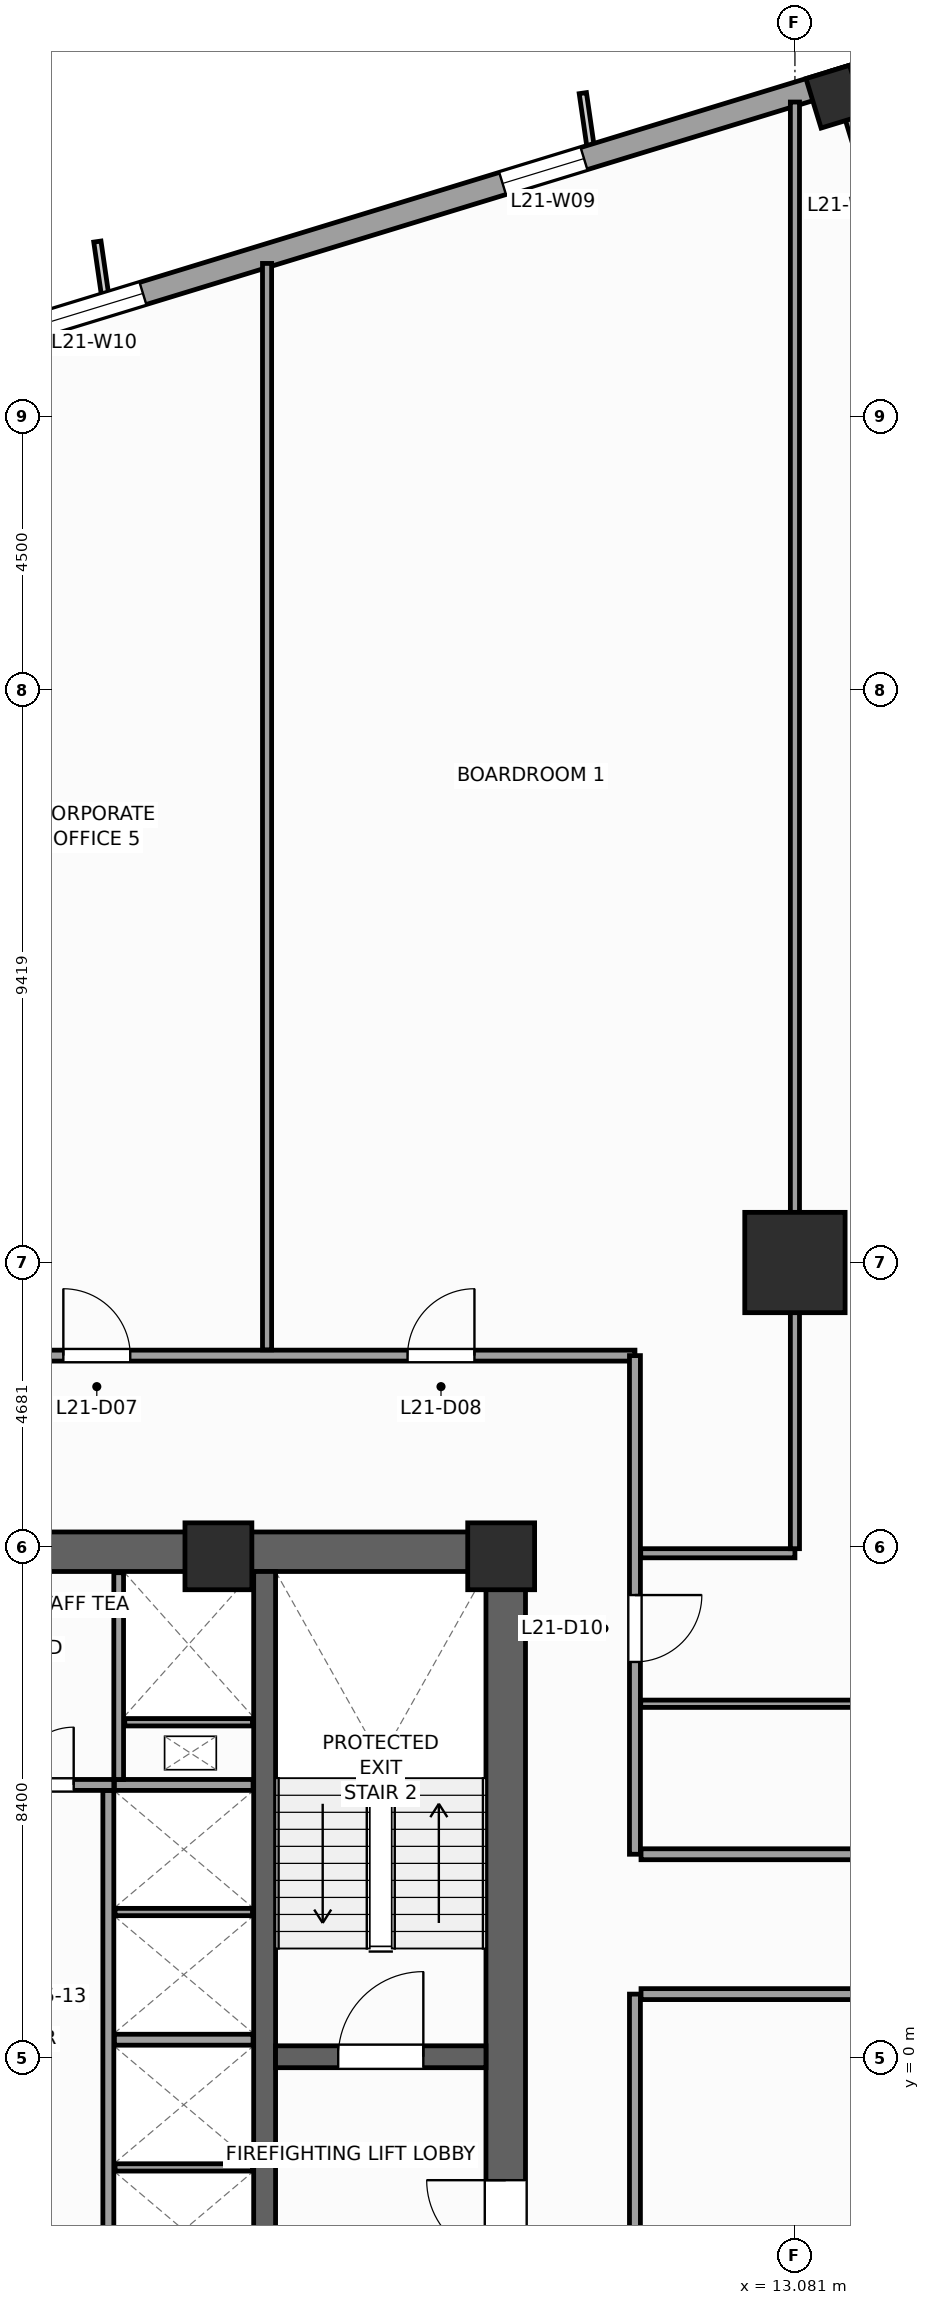
"""IFC4 building model, lengths in metres.
Left out: names, types, materials, properties, quantities, classifications, styles, units other than length and angle.
Written with IfcOpenShell. Run it as: python <this file> out.ifc"""

import sys

from ifc_helpers import new_model, si_unit, direction, frame, frame_2d, origin, origin_2d, place, context, subcontext, project, spatial, rectangle, extrude, source, transform, mapped, element, fill, save


model = new_model("IFC4")
c1 = context("Model", 3, precision=1e-05, world=origin(), true_north=direction((0.0, 1.0)))
c2 = subcontext(c1, "Body", "Model", "MODEL_VIEW")
j1 = project(units=[si_unit("LENGTHUNIT", "METRE"), si_unit("PLANEANGLEUNIT", "RADIAN")], contexts=[c1])
p1 = place(None, origin())
s1 = spatial("IfcSite", under=j1, at=p1, CompositionType="ELEMENT")
p2 = place(p1, origin())
s2 = spatial("IfcBuilding", under=s1, at=p2, CompositionType="ELEMENT")
p3 = place(p2, frame((0.0, 0.0, 91.2)))
s3 = spatial("IfcBuildingStorey", under=s2, at=p3, CompositionType="ELEMENT", Elevation=91.2)
p4 = place(p3, frame((-8.65, 8.325, 0.0), z_axis=(0.0, 0.0, 1.0), x_axis=(1.0, 0.0, 0.0)))
e1 = element("IfcWall", 1, at=p4, inside=s3, PredefinedType="SHEAR", context=c2, shape_type="SweptSolid", body=[
    extrude(rectangle(XDim=17.3, YDim=0.65, at=frame_2d((8.65, 0.0))), origin(), (0.0, 0.0, 1.0), 4.0),
])
p5 = place(p3, frame((8.325, -8.0, 0.0), z_axis=(0.0, 0.0, 1.0), x_axis=(0.0, 1.0, 0.0)))
e2 = element("IfcWall", 2, at=p5, inside=s3, PredefinedType="SHEAR", context=c2, shape_type="SweptSolid", body=[
    extrude(rectangle(XDim=16.0, YDim=0.65, at=frame_2d((8.0, 0.0))), origin(), (0.0, 0.0, 1.0), 4.0),
])
p6 = place(p5, frame((4.69, 0.0, 0.0)))
e3 = element("IfcOpeningElement", 3, at=p6, cuts=e2, PredefinedType="OPENING", context=c2, shape_type="SweptSolid", body=[
    extrude(rectangle(XDim=1.3, YDim=2.2, at=frame_2d((0.65, 1.1))), frame((0.0, 0.335, 0.0), z_axis=(0.0, -1.0, 0.0), x_axis=(1.0, 0.0, 0.0)), (0.0, 0.0, 1.0), 0.67),
])
p7 = place(p3, frame((4.36, -8.0, 0.0), z_axis=(0.0, 0.0, 1.0), x_axis=(0.0, 1.0, 0.0)))
e4 = element("IfcWall", 4, at=p7, inside=s3, PredefinedType="SHEAR", context=c2, shape_type="SweptSolid", body=[
    extrude(rectangle(XDim=16.0, YDim=0.36, at=frame_2d((8.0, 0.0))), origin(), (0.0, 0.0, 1.0), 4.0),
])
p8 = place(p3, frame((4.54, 0.02, 0.0), z_axis=(0.0, 0.0, 1.0), x_axis=(1.0, 0.0, 0.0)))
e5 = element("IfcWall", 5, at=p8, inside=s3, PredefinedType="SHEAR", context=c2, shape_type="SweptSolid", body=[
    extrude(rectangle(XDim=3.46, YDim=0.36, at=frame_2d((1.73, 0.0))), origin(), (0.0, 0.0, 1.0), 4.0),
])
p9 = place(p8, frame((1.03, 0.0, 0.0)))
e6 = element("IfcOpeningElement", 6, at=p9, cuts=e5, PredefinedType="OPENING", context=c2, shape_type="SweptSolid", body=[
    extrude(rectangle(XDim=1.4, YDim=2.2, at=frame_2d((0.7, 1.1))), frame((0.0, 0.19, 0.0), z_axis=(0.0, -1.0, 0.0), x_axis=(1.0, 0.0, 0.0)), (0.0, 0.0, 1.0), 0.38),
])
m1 = source(origin(), c2, "Body", "SweptSolid", [
    extrude(rectangle(XDim=1.1, YDim=1.1, at=origin_2d()), origin(), (0.0, 0.0, 1.0), 4.0),
])
for number, where, z_axis, x_axis in (
    (7, (8.25, 8.25, 0.0), (0.0, 0.0, 1.0), (1.0, 0.0, 0.0)),
    (8, (3.6, 8.25, 0.0), (0.0, 0.0, 1.0), (1.0, 0.0, 0.0)),
):
    element("IfcColumn", number, at=place(p3, frame(where, z_axis=z_axis, x_axis=x_axis)), inside=s3, PredefinedType="PILASTER", context=c2, shape_type="MappedRepresentation", body=[
        mapped(m1, transform((0.0, 0.0, 0.0), scale=1.0)),
    ])
m2 = source(origin(), c2, "Body", "SweptSolid", [
    extrude(rectangle(XDim=1.65, YDim=1.65, at=origin_2d()), origin(), (0.0, 0.0, 1.0), 4.0),
])
p10 = place(p3, frame((13.081, 13.081, 0.0), z_axis=(0.0, 0.0, 1.0), x_axis=(1.0, 0.0, 0.0)))
e9 = element("IfcColumn", 9, at=p10, inside=s3, PredefinedType="COLUMN", context=c2, shape_type="MappedRepresentation", body=[
    mapped(m2, transform((0.0, 0.0, 0.0), scale=1.0)),
])
m3 = source(origin(), c2, "Body", "SweptSolid", [
    extrude(rectangle(XDim=0.75, YDim=0.85, at=origin_2d()), origin(), (0.0, 0.0, 1.0), 4.0),
])
p11 = place(p3, frame((13.746, 32.253, 0.0), z_axis=(0.0, 0.0, 1.0), x_axis=(0.956304755963, 0.292371704723, 0.0)))
e10 = element("IfcColumn", 10, at=p11, inside=s3, PredefinedType="COLUMN", context=c2, shape_type="MappedRepresentation", body=[
    mapped(m3, transform((0.0, 0.0, 0.0), scale=1.0)),
])
p12 = place(p3, frame((15.144, 28.482, 0.0), z_axis=(0.0, 0.0, 1.0), x_axis=(-0.292373601522, 0.956304176051, 0.0)))
e11 = element("IfcWall", 11, at=p12, inside=s3, PredefinedType="STANDARD", context=c2, shape_type="SweptSolid", body=[
    extrude(rectangle(XDim=4.44, YDim=0.38, at=frame_2d((2.22, 0.0))), origin(), (0.0, 0.0, 1.0), 3.04),
])
p13 = place(p12, frame((1.52, 0.0, 0.51)))
e12 = element("IfcOpeningElement", 12, at=p13, cuts=e11, PredefinedType="OPENING", context=c2, shape_type="SweptSolid", body=[
    extrude(rectangle(XDim=1.4, YDim=2.4, at=frame_2d((0.7, 1.2))), frame((0.0, 0.2, 0.0), z_axis=(0.0, -1.0, 0.0), x_axis=(1.0, 0.0, 0.0)), (0.0, 0.0, 1.0), 0.4),
])
p14 = place(p3, frame((14.265, 32.658, 0.0), z_axis=(0.0, 0.0, 1.0), x_axis=(-0.956304320851, -0.292373127906, 0.0)))
e13 = element("IfcWall", 13, at=p14, inside=s3, PredefinedType="STANDARD", context=c2, shape_type="SweptSolid", body=[
    extrude(rectangle(XDim=46.38, YDim=0.38, at=frame_2d((23.19, 0.0))), origin(), (0.0, 0.0, 1.0), 3.14),
])
p15 = place(p14, frame((17.065, 0.0, 0.0)))
e14 = element("IfcOpeningElement", 14, at=p15, cuts=e13, PredefinedType="OPENING", context=c2, shape_type="SweptSolid", body=[
    extrude(rectangle(XDim=1.05, YDim=2.25, at=frame_2d((0.525, 1.125))), frame((0.0, 0.2, 0.0), z_axis=(0.0, -1.0, 0.0), x_axis=(1.0, 0.0, 0.0)), (0.0, 0.0, 1.0), 0.4),
])
p16 = place(p14, frame((4.865, 0.0, 0.51)))
e15 = element("IfcOpeningElement", 15, at=p16, cuts=e13, PredefinedType="OPENING", context=c2, shape_type="SweptSolid", body=[
    extrude(rectangle(XDim=1.4, YDim=2.4, at=frame_2d((0.7, 1.2))), frame((0.0, 0.2, 0.0), z_axis=(0.0, -1.0, 0.0), x_axis=(1.0, 0.0, 0.0)), (0.0, 0.0, 1.0), 0.4),
])
p17 = place(p14, frame((12.45, 0.0, 0.51)))
e16 = element("IfcOpeningElement", 16, at=p17, cuts=e13, PredefinedType="OPENING", context=c2, shape_type="SweptSolid", body=[
    extrude(rectangle(XDim=2.0, YDim=2.4, at=frame_2d((1.0, 1.2))), frame((0.0, 0.2, 0.0), z_axis=(0.0, -1.0, 0.0), x_axis=(1.0, 0.0, 0.0)), (0.0, 0.0, 1.0), 0.4),
])
p18 = place(p14, frame((30.538, 0.0, 0.51)))
e17 = element("IfcOpeningElement", 17, at=p18, cuts=e13, PredefinedType="OPENING", context=c2, shape_type="SweptSolid", body=[
    extrude(rectangle(XDim=2.0, YDim=2.4, at=frame_2d((1.0, 1.2))), frame((0.0, 0.2, 0.0), z_axis=(0.0, -1.0, 0.0), x_axis=(1.0, 0.0, 0.0)), (0.0, 0.0, 1.0), 0.4),
])
p19 = place(p14, frame((39.187, 0.0, 0.51)))
e18 = element("IfcOpeningElement", 18, at=p19, cuts=e13, PredefinedType="OPENING", context=c2, shape_type="SweptSolid", body=[
    extrude(rectangle(XDim=1.4, YDim=2.4, at=frame_2d((0.7, 1.2))), frame((0.0, 0.2, 0.0), z_axis=(0.0, -1.0, 0.0), x_axis=(1.0, 0.0, 0.0)), (0.0, 0.0, 1.0), 0.4),
])
p20 = place(p3, frame((1.79, -7.98, 0.0), z_axis=(0.0, 0.0, 1.0), x_axis=(0.0, 1.0, 0.0)))
e19 = element("IfcWall", 19, at=p20, inside=s3, PredefinedType="PARTITIONING", context=c2, shape_type="SweptSolid", body=[
    extrude(rectangle(XDim=12.38, YDim=0.18, at=frame_2d((6.19, 0.0))), origin(), (0.0, 0.0, 1.0), 3.74),
])
p21 = place(p20, frame((0.4, 0.0, 0.0)))
e20 = element("IfcOpeningElement", 20, at=p21, cuts=e19, PredefinedType="OPENING", context=c2, shape_type="SweptSolid", body=[
    extrude(rectangle(XDim=1.1, YDim=2.2, at=frame_2d((0.55, 1.1))), frame((0.0, 0.1, 0.0), z_axis=(0.0, -1.0, 0.0), x_axis=(1.0, 0.0, 0.0)), (0.0, 0.0, 1.0), 0.2),
])
p22 = place(p20, frame((2.46, 0.0, 0.0)))
e21 = element("IfcOpeningElement", 21, at=p22, cuts=e19, PredefinedType="OPENING", context=c2, shape_type="SweptSolid", body=[
    extrude(rectangle(XDim=1.1, YDim=2.2, at=frame_2d((0.55, 1.1))), frame((0.0, 0.1, 0.0), z_axis=(0.0, -1.0, 0.0), x_axis=(1.0, 0.0, 0.0)), (0.0, 0.0, 1.0), 0.2),
])
p23 = place(p3, frame((-1.88, 4.49, 0.0), z_axis=(0.0, 0.0, 1.0), x_axis=(1.0, 0.0, 0.0)))
e22 = element("IfcWall", 22, at=p23, inside=s3, PredefinedType="PARTITIONING", context=c2, shape_type="SweptSolid", body=[
    extrude(rectangle(XDim=3.76, YDim=0.18, at=frame_2d((1.88, 0.0))), origin(), (0.0, 0.0, 1.0), 3.74),
])
p24 = place(p23, frame((0.28, 0.0, 0.0)))
e23 = element("IfcOpeningElement", 23, at=p24, cuts=e22, PredefinedType="OPENING", context=c2, shape_type="SweptSolid", body=[
    extrude(rectangle(XDim=0.88, YDim=2.1, at=frame_2d((0.44, 1.05))), frame((0.0, 0.1, 0.0), z_axis=(0.0, -1.0, 0.0), x_axis=(1.0, 0.0, 0.0)), (0.0, 0.0, 1.0), 0.2),
])
p25 = place(p23, frame((2.15, 0.0, 0.0)))
e24 = element("IfcOpeningElement", 24, at=p25, cuts=e22, PredefinedType="OPENING", context=c2, shape_type="SweptSolid", body=[
    extrude(rectangle(XDim=0.95, YDim=2.1, at=frame_2d((0.475, 1.05))), frame((0.0, 0.1, 0.0), z_axis=(0.0, -1.0, 0.0), x_axis=(1.0, 0.0, 0.0)), (0.0, 0.0, 1.0), 0.2),
])
for number, where, z_axis, x_axis in (
    (25, (1.89, 0.3, 0.0), (0.0, 0.0, 1.0), (1.0, 0.0, 0.0)),
    (26, (1.89, 4.49, 0.0), (0.0, 0.0, 1.0), (1.0, 0.0, 0.0)),
):
    element("IfcWall", number, at=place(p3, frame(where, z_axis=z_axis, x_axis=x_axis)), inside=s3, PredefinedType="PARTITIONING", context=c2, shape_type="SweptSolid", body=[
        extrude(rectangle(XDim=2.28, YDim=0.18, at=frame_2d((1.14, 0.0))), origin(), (0.0, 0.0, 1.0), 3.74),
    ])
for number, where, z_axis, x_axis in (
    (27, (1.9, -1.8, 0.0), (0.0, 0.0, 1.0), (1.0, 0.0, 0.0)),
    (28, (1.9, 2.4, 0.0), (0.0, 0.0, 1.0), (1.0, 0.0, 0.0)),
):
    element("IfcWall", number, at=place(p3, frame(where, z_axis=z_axis, x_axis=x_axis)), inside=s3, PredefinedType="PARTITIONING", context=c2, shape_type="SweptSolid", body=[
        extrude(rectangle(XDim=2.26, YDim=0.12, at=frame_2d((1.13, 0.0))), origin(), (0.0, 0.0, 1.0), 3.74),
    ])
p26 = place(p3, frame((1.96, 4.58, 0.0), z_axis=(0.0, 0.0, 1.0), x_axis=(0.0, 1.0, 0.0)))
e29 = element("IfcWall", 29, at=p26, inside=s3, PredefinedType="PARTITIONING", context=c2, shape_type="SweptSolid", body=[
    extrude(rectangle(XDim=3.4, YDim=0.16, at=frame_2d((1.7, 0.0))), origin(), (0.0, 0.0, 1.0), 3.74),
])
p27 = place(p3, frame((2.06, 5.52, 0.0), z_axis=(0.0, 0.0, 1.0), x_axis=(1.0, 0.0, 0.0)))
e30 = element("IfcWall", 30, at=p27, inside=s3, PredefinedType="PARTITIONING", context=c2, shape_type="SweptSolid", body=[
    extrude(rectangle(XDim=2.1, YDim=0.12, at=frame_2d((1.05, 0.0))), origin(), (0.0, 0.0, 1.0), 3.74),
])
p28 = place(p3, frame((-12.6, 11.55, 0.0), z_axis=(0.0, 0.0, 1.0), x_axis=(1.0, 0.0, 0.0)))
e31 = element("IfcWall", 31, at=p28, inside=s3, PredefinedType="PARTITIONING", context=c2, shape_type="SweptSolid", body=[
    extrude(rectangle(XDim=23.05, YDim=0.18, at=frame_2d((11.525, 0.0))), origin(), (0.0, 0.0, 1.0), 3.74),
])
p29 = place(p28, frame((2.514, 0.0, 0.0)))
e32 = element("IfcOpeningElement", 32, at=p29, cuts=e31, PredefinedType="OPENING", context=c2, shape_type="SweptSolid", body=[
    extrude(rectangle(XDim=1.1, YDim=2.2, at=frame_2d((0.55, 1.1))), frame((0.0, 0.1, 0.0), z_axis=(0.0, -1.0, 0.0), x_axis=(1.0, 0.0, 0.0)), (0.0, 0.0, 1.0), 0.2),
])
p30 = place(p28, frame((8.05, 0.0, 0.0)))
e33 = element("IfcOpeningElement", 33, at=p30, cuts=e31, PredefinedType="OPENING", context=c2, shape_type="SweptSolid", body=[
    extrude(rectangle(XDim=1.1, YDim=2.2, at=frame_2d((0.55, 1.1))), frame((0.0, 0.1, 0.0), z_axis=(0.0, -1.0, 0.0), x_axis=(1.0, 0.0, 0.0)), (0.0, 0.0, 1.0), 0.2),
])
p31 = place(p28, frame((13.65, 0.0, 0.0)))
e34 = element("IfcOpeningElement", 34, at=p31, cuts=e31, PredefinedType="OPENING", context=c2, shape_type="SweptSolid", body=[
    extrude(rectangle(XDim=1.1, YDim=2.2, at=frame_2d((0.55, 1.1))), frame((0.0, 0.1, 0.0), z_axis=(0.0, -1.0, 0.0), x_axis=(1.0, 0.0, 0.0)), (0.0, 0.0, 1.0), 0.2),
])
p32 = place(p28, frame((19.311, 0.0, 0.0)))
e35 = element("IfcOpeningElement", 35, at=p32, cuts=e31, PredefinedType="OPENING", context=c2, shape_type="SweptSolid", body=[
    extrude(rectangle(XDim=1.1, YDim=2.2, at=frame_2d((0.55, 1.1))), frame((0.0, 0.1, 0.0), z_axis=(0.0, -1.0, 0.0), x_axis=(1.0, 0.0, 0.0)), (0.0, 0.0, 1.0), 0.2),
])
p33 = place(p3, frame((10.45, -12.6, 0.0), z_axis=(0.0, 0.0, 1.0), x_axis=(0.0, 1.0, 0.0)))
e36 = element("IfcWall", 36, at=p33, inside=s3, PredefinedType="PARTITIONING", context=c2, shape_type="SweptSolid", body=[
    extrude(rectangle(XDim=13.65, YDim=0.18, at=frame_2d((6.825, 0.0))), origin(), (0.0, 0.0, 1.0), 3.74),
])
p34 = place(p3, frame((10.45, 3.35, 0.0), z_axis=(0.0, 0.0, 1.0), x_axis=(0.0, 1.0, 0.0)))
e37 = element("IfcWall", 37, at=p34, inside=s3, PredefinedType="PARTITIONING", context=c2, shape_type="SweptSolid", body=[
    extrude(rectangle(XDim=8.2, YDim=0.18, at=frame_2d((4.1, 0.0))), origin(), (0.0, 0.0, 1.0), 3.74),
])
p35 = place(p34, frame((3.163, 0.0, 0.0)))
e38 = element("IfcOpeningElement", 38, at=p35, cuts=e37, PredefinedType="OPENING", context=c2, shape_type="SweptSolid", body=[
    extrude(rectangle(XDim=1.1, YDim=2.2, at=frame_2d((0.55, 1.1))), frame((0.0, 0.1, 0.0), z_axis=(0.0, -1.0, 0.0), x_axis=(1.0, 0.0, 0.0)), (0.0, 0.0, 1.0), 0.2),
])
p36 = place(p3, frame((10.55, 1.05, 0.0), z_axis=(0.0, 0.0, 1.0), x_axis=(1.0, 0.0, 0.0)))
e39 = element("IfcWall", 39, at=p36, inside=s3, PredefinedType="PARTITIONING", context=c2, shape_type="SweptSolid", body=[
    extrude(rectangle(XDim=17.295, YDim=0.18, at=frame_2d((8.647, 0.0))), origin(), (0.0, 0.0, 1.0), 3.74),
])
p37 = place(p36, frame((8.097, 0.0, 0.0)))
e40 = element("IfcOpeningElement", 40, at=p37, cuts=e39, PredefinedType="OPENING", context=c2, shape_type="SweptSolid", body=[
    extrude(rectangle(XDim=1.1, YDim=2.2, at=frame_2d((0.55, 1.1))), frame((0.0, 0.1, 0.0), z_axis=(0.0, -1.0, 0.0), x_axis=(1.0, 0.0, 0.0)), (0.0, 0.0, 1.0), 0.2),
])
p38 = place(p3, frame((10.55, 3.35, 0.0), z_axis=(0.0, 0.0, 1.0), x_axis=(1.0, 0.0, 0.0)))
e41 = element("IfcWall", 41, at=p38, inside=s3, PredefinedType="PARTITIONING", context=c2, shape_type="SweptSolid", body=[
    extrude(rectangle(XDim=16.592, YDim=0.18, at=frame_2d((8.296, 0.0))), origin(), (0.0, 0.0, 1.0), 3.74),
])
p39 = place(p38, frame((7.746, 0.0, 0.0)))
e42 = element("IfcOpeningElement", 42, at=p39, cuts=e41, PredefinedType="OPENING", context=c2, shape_type="SweptSolid", body=[
    extrude(rectangle(XDim=1.1, YDim=2.2, at=frame_2d((0.55, 1.1))), frame((0.0, 0.1, 0.0), z_axis=(0.0, -1.0, 0.0), x_axis=(1.0, 0.0, 0.0)), (0.0, 0.0, 1.0), 0.2),
])
p40 = place(p3, frame((4.4, 11.645, 0.0), z_axis=(0.0, 0.0, 1.0), x_axis=(0.0, 1.0, 0.0)))
e43 = element("IfcWall", 43, at=p40, inside=s3, PredefinedType="PARTITIONING", context=c2, shape_type="SweptSolid", body=[
    extrude(rectangle(XDim=17.866, YDim=0.15, at=frame_2d((8.933, 0.0))), origin(), (0.0, 0.0, 1.0), 3.74),
])
p41 = place(p3, frame((10.545, 8.3, 0.0), z_axis=(0.0, 0.0, 1.0), x_axis=(1.0, 0.0, 0.0)))
e44 = element("IfcWall", 44, at=p41, inside=s3, PredefinedType="PARTITIONING", context=c2, shape_type="SweptSolid", body=[
    extrude(rectangle(XDim=2.536, YDim=0.15, at=frame_2d((1.268, 0.0))), origin(), (0.0, 0.0, 1.0), 3.74),
])
p42 = place(p3, frame((13.081, 8.375, 0.0), z_axis=(0.0, 0.0, 1.0), x_axis=(0.0, 1.0, 0.0)))
e45 = element("IfcWall", 45, at=p42, inside=s3, PredefinedType="PARTITIONING", context=c2, shape_type="SweptSolid", body=[
    extrude(rectangle(XDim=23.79, YDim=0.15, at=frame_2d((11.895, 0.0))), origin(), (0.0, 0.0, 1.0), 2.732),
])
p43 = place(p3, frame((10.545, 5.825, 0.0), z_axis=(0.0, 0.0, 1.0), x_axis=(1.0, 0.0, 0.0)))
e46 = element("IfcWall", 46, at=p43, inside=s3, PredefinedType="PARTITIONING", context=c2, shape_type="SweptSolid", body=[
    extrude(rectangle(XDim=15.84, YDim=0.12, at=frame_2d((7.92, 0.0))), origin(), (0.0, 0.0, 1.0), 3.74),
])
m4 = source(origin(), c2, "Body", "SweptSolid", [
    extrude(rectangle(XDim=1.4, YDim=2.4, at=frame_2d((0.7, 1.2))), frame((0.0, 0.03, 0.0), z_axis=(0.0, -1.0, 0.0), x_axis=(1.0, 0.0, 0.0)), (0.0, 0.0, 1.0), 0.06),
])
p44 = place(p16, origin())
e47 = element("IfcWindow", 47, at=p44, inside=s3, PartitioningType="SINGLE_PANEL", PredefinedType="WINDOW", context=c2, shape_type="MappedRepresentation", body=[
    mapped(m4, transform((0.0, 0.0, 0.0), scale=1.0)),
])
fill(e15, e47)
m5 = source(origin(), c2, "Body", "SweptSolid", [
    extrude(rectangle(XDim=2.0, YDim=2.4, at=frame_2d((1.0, 1.2))), frame((0.0, 0.03, 0.0), z_axis=(0.0, -1.0, 0.0), x_axis=(1.0, 0.0, 0.0)), (0.0, 0.0, 1.0), 0.06),
])
p45 = place(p17, origin())
e48 = element("IfcWindow", 48, at=p45, inside=s3, PartitioningType="SINGLE_PANEL", PredefinedType="WINDOW", context=c2, shape_type="MappedRepresentation", body=[
    mapped(m5, transform((0.0, 0.0, 0.0), scale=1.0)),
])
fill(e16, e48)
m6 = source(origin(), c2, "Body", "SweptSolid", [
    extrude(rectangle(XDim=1.4, YDim=2.2, at=frame_2d((0.7, 1.1))), frame((0.0, 0.025, 0.0), z_axis=(0.0, -1.0, 0.0), x_axis=(1.0, 0.0, 0.0)), (0.0, 0.0, 1.0), 0.05),
])
p46 = place(p9, origin())
e49 = element("IfcDoor", 49, at=p46, inside=s3, OperationType="SINGLE_SWING_RIGHT", PredefinedType="DOOR", context=c2, shape_type="MappedRepresentation", body=[
    mapped(m6, transform((0.0, 0.0, 0.0), scale=1.0)),
])
fill(e6, e49)
m7 = source(origin(), c2, "Body", "SweptSolid", [
    extrude(rectangle(XDim=1.3, YDim=2.2, at=frame_2d((0.65, 1.1))), frame((0.0, 0.025, 0.0), z_axis=(0.0, -1.0, 0.0), x_axis=(1.0, 0.0, 0.0)), (0.0, 0.0, 1.0), 0.05),
])
p47 = place(p6, origin())
e50 = element("IfcDoor", 50, at=p47, inside=s3, OperationType="SINGLE_SWING_RIGHT", PredefinedType="DOOR", context=c2, shape_type="MappedRepresentation", body=[
    mapped(m7, transform((0.0, 0.0, 0.0), scale=1.0)),
])
fill(e3, e50)
m8 = source(origin(), c2, "Body", "SweptSolid", [
    extrude(rectangle(XDim=0.95, YDim=2.1, at=frame_2d((0.475, 1.05))), frame((0.0, 0.025, 0.0), z_axis=(0.0, -1.0, 0.0), x_axis=(1.0, 0.0, 0.0)), (0.0, 0.0, 1.0), 0.05),
])
p48 = place(p25, origin())
e51 = element("IfcDoor", 51, at=p48, inside=s3, OperationType="SINGLE_SWING_RIGHT", PredefinedType="DOOR", context=c2, shape_type="MappedRepresentation", body=[
    mapped(m8, transform((0.0, 0.0, 0.0), scale=1.0)),
])
fill(e24, e51)
m9 = source(origin(), c2, "Body", "SweptSolid", [
    extrude(rectangle(XDim=1.1, YDim=2.2, at=frame_2d((0.55, 1.1))), frame((0.0, 0.025, 0.0), z_axis=(0.0, -1.0, 0.0), x_axis=(1.0, 0.0, 0.0)), (0.0, 0.0, 1.0), 0.05),
])
p49 = place(p31, origin())
e52 = element("IfcDoor", 52, at=p49, inside=s3, OperationType="SINGLE_SWING_LEFT", PredefinedType="DOOR", context=c2, shape_type="MappedRepresentation", body=[
    mapped(m9, transform((0.0, 0.0, 0.0), scale=1.0)),
])
fill(e34, e52)
p50 = place(p32, origin())
e53 = element("IfcDoor", 53, at=p50, inside=s3, OperationType="SINGLE_SWING_RIGHT", PredefinedType="DOOR", context=c2, shape_type="MappedRepresentation", body=[
    mapped(m9, transform((0.0, 0.0, 0.0), scale=1.0)),
])
fill(e35, e53)
p51 = place(p35, frame((1.1, 0.0, 0.0), z_axis=(0.0, 0.0, 1.0), x_axis=(-1.0, 0.0, 0.0)))
e54 = element("IfcDoor", 54, at=p51, inside=s3, OperationType="SINGLE_SWING_RIGHT", PredefinedType="DOOR", context=c2, shape_type="MappedRepresentation", body=[
    mapped(m9, transform((0.0, 0.0, 0.0), scale=1.0)),
])
fill(e38, e54)
save(model, sys.argv[1])
